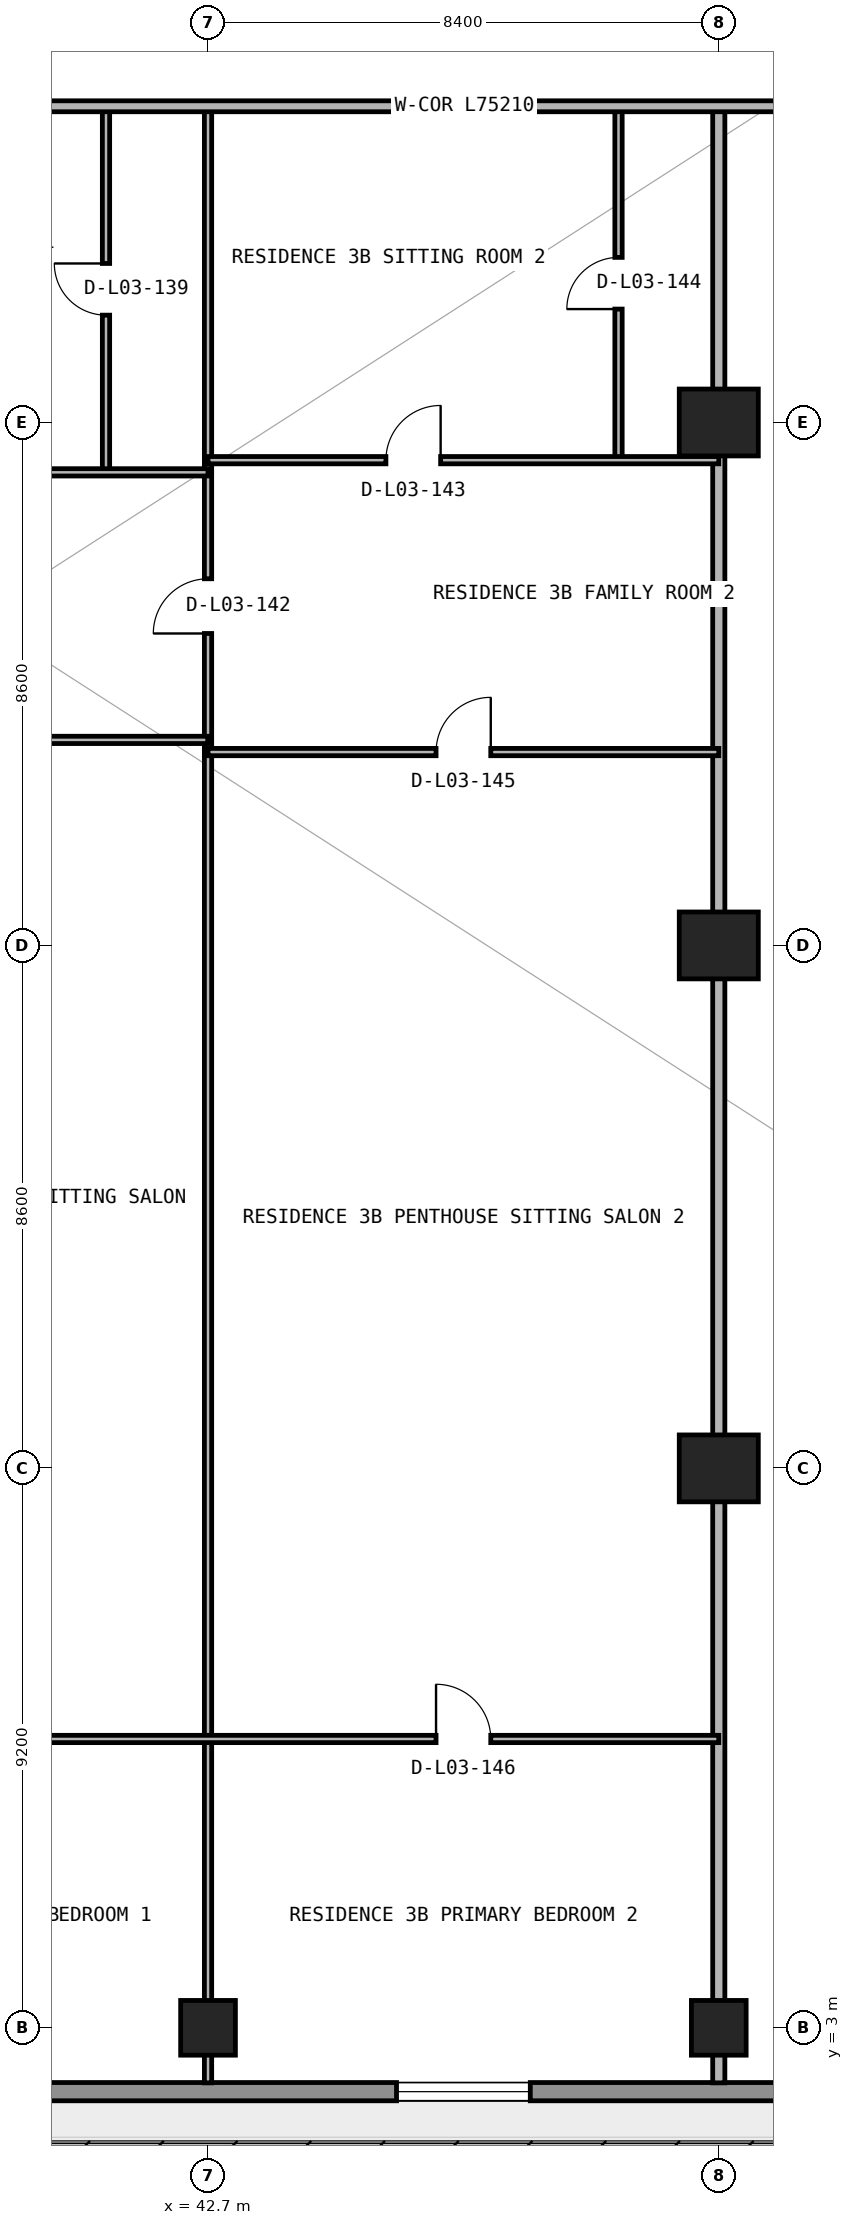
"""IFC4 building model, lengths in metres.
Left out: names, types, materials, properties, quantities, classifications, styles, units other than length and angle.
Written with IfcOpenShell. Run it as: python <this file> out.ifc"""

import sys

from ifc_helpers import new_model, si_unit, direction, frame, frame_2d, origin, origin_2d, place, context, subcontext, project, spatial, rectangle, circle, extrude, element, fill, save


model = new_model("IFC4")
c1 = context("Model", 3, precision=1e-05, world=origin(), true_north=direction((0.0, 1.0)))
c2 = subcontext(c1, "Body", "Model", "MODEL_VIEW")
j1 = project(units=[si_unit("LENGTHUNIT", "METRE"), si_unit("PLANEANGLEUNIT", "RADIAN")], contexts=[c1])
p1 = place(None, origin())
s1 = spatial("IfcSite", under=j1, at=p1, CompositionType="ELEMENT")
p2 = place(p1, origin())
s2 = spatial("IfcBuilding", under=s1, at=p2, CompositionType="ELEMENT")
p3 = place(p2, frame((0.0, 0.0, 15.0)))
s3 = spatial("IfcBuildingStorey", under=s2, at=p3, CompositionType="ELEMENT", Elevation=15.0)
for number, where, z_axis, x_axis in (
    (1, (42.7, 3.0, 0.0), (0.0, 0.0, 1.0), (1.0, 0.0, 0.0)),
    (2, (51.1, 3.0, 0.0), (0.0, 0.0, 1.0), (1.0, 0.0, 0.0)),
):
    element("IfcColumn", number, at=place(p3, frame(where, z_axis=z_axis, x_axis=x_axis)), inside=s3, PredefinedType="COLUMN", context=c2, shape_type="SweptSolid", body=[
        extrude(circle(Radius=0.45, at=origin_2d()), origin(), (0.0, 0.0, 1.0), 4.5),
    ])
for number, where, z_axis, x_axis in (
    (3, (51.1, 12.2, 0.0), (0.0, 0.0, 1.0), (1.0, 0.0, 0.0)),
    (4, (51.1, 20.8, 0.0), (0.0, 0.0, 1.0), (1.0, 0.0, 0.0)),
    (5, (51.1, 29.4, 0.0), (0.0, 0.0, 1.0), (1.0, 0.0, 0.0)),
):
    element("IfcColumn", number, at=place(p3, frame(where, z_axis=z_axis, x_axis=x_axis)), inside=s3, PredefinedType="COLUMN", context=c2, shape_type="SweptSolid", body=[
        extrude(rectangle(XDim=1.3, YDim=1.1, at=origin_2d()), origin(), (0.0, 0.0, 1.0), 4.5),
    ])
p4 = place(p3, frame((76.8, 1.95, 0.0), z_axis=(0.0, 0.0, 1.0), x_axis=(-1.0, 0.0, 0.0)))
e6 = element("IfcWall", 6, at=p4, inside=s3, PredefinedType="STANDARD", context=c2, shape_type="SweptSolid", body=[
    extrude(rectangle(XDim=75.8, YDim=0.3, at=frame_2d((37.9, 0.0))), origin(), (0.0, 0.0, 1.0), 4.5),
])
p5 = place(p4, frame((69.775, 0.0, 0.85)))
e7 = element("IfcOpeningElement", 7, at=p5, cuts=e6, PredefinedType="OPENING", context=c2, shape_type="SweptSolid", body=[
    extrude(rectangle(XDim=3.0, YDim=2.4, at=frame_2d((1.5, 1.2))), frame((0.0, 0.16, 0.0), z_axis=(0.0, -1.0, 0.0), x_axis=(1.0, 0.0, 0.0)), (0.0, 0.0, 1.0), 0.32),
])
p6 = place(p4, frame((61.8, 0.0, 0.0)))
e8 = element("IfcOpeningElement", 8, at=p6, cuts=e6, PredefinedType="OPENING", context=c2, shape_type="SweptSolid", body=[
    extrude(rectangle(XDim=1.8, YDim=2.3, at=frame_2d((0.9, 1.15))), frame((0.0, 0.16, 0.0), z_axis=(0.0, -1.0, 0.0), x_axis=(1.0, 0.0, 0.0)), (0.0, 0.0, 1.0), 0.32),
])
p7 = place(p4, frame((53.2, 0.0, 0.85)))
e9 = element("IfcOpeningElement", 9, at=p7, cuts=e6, PredefinedType="OPENING", context=c2, shape_type="SweptSolid", body=[
    extrude(rectangle(XDim=2.2, YDim=1.55, at=frame_2d((1.1, 0.775))), frame((0.0, 0.16, 0.0), z_axis=(0.0, -1.0, 0.0), x_axis=(1.0, 0.0, 0.0)), (0.0, 0.0, 1.0), 0.32),
])
p8 = place(p4, frame((45.0, 0.0, 0.0)))
e10 = element("IfcOpeningElement", 10, at=p8, cuts=e6, PredefinedType="OPENING", context=c2, shape_type="SweptSolid", body=[
    extrude(rectangle(XDim=1.8, YDim=2.3, at=frame_2d((0.9, 1.15))), frame((0.0, 0.16, 0.0), z_axis=(0.0, -1.0, 0.0), x_axis=(1.0, 0.0, 0.0)), (0.0, 0.0, 1.0), 0.32),
])
p9 = place(p4, frame((36.8, 0.0, 0.85)))
e11 = element("IfcOpeningElement", 11, at=p9, cuts=e6, PredefinedType="OPENING", context=c2, shape_type="SweptSolid", body=[
    extrude(rectangle(XDim=2.2, YDim=1.55, at=frame_2d((1.1, 0.775))), frame((0.0, 0.16, 0.0), z_axis=(0.0, -1.0, 0.0), x_axis=(1.0, 0.0, 0.0)), (0.0, 0.0, 1.0), 0.32),
])
p10 = place(p4, frame((28.8, 0.0, 0.85)))
e12 = element("IfcOpeningElement", 12, at=p10, cuts=e6, PredefinedType="OPENING", context=c2, shape_type="SweptSolid", body=[
    extrude(rectangle(XDim=2.2, YDim=1.55, at=frame_2d((1.1, 0.775))), frame((0.0, 0.16, 0.0), z_axis=(0.0, -1.0, 0.0), x_axis=(1.0, 0.0, 0.0)), (0.0, 0.0, 1.0), 0.32),
])
p11 = place(p4, frame((12.025, 0.0, 0.0)))
e13 = element("IfcOpeningElement", 13, at=p11, cuts=e6, PredefinedType="OPENING", context=c2, shape_type="SweptSolid", body=[
    extrude(rectangle(XDim=1.8, YDim=2.3, at=frame_2d((0.9, 1.15))), frame((0.0, 0.16, 0.0), z_axis=(0.0, -1.0, 0.0), x_axis=(1.0, 0.0, 0.0)), (0.0, 0.0, 1.0), 0.32),
])
p12 = place(p3, frame((41.022, 28.58, 0.0), z_axis=(0.0, 0.0, 1.0), x_axis=(0.0, 1.0, 0.0)))
e14 = element("IfcWall", 14, at=p12, inside=s3, PredefinedType="PARTITIONING", context=c2, shape_type="SweptSolid", body=[
    extrude(rectangle(XDim=6.02, YDim=0.12, at=frame_2d((3.01, 0.0))), origin(), (0.0, 0.0, 1.0), 4.5),
])
p13 = place(p12, frame((2.585, 0.0, 0.0)))
e15 = element("IfcOpeningElement", 15, at=p13, cuts=e14, PredefinedType="OPENING", context=c2, shape_type="SweptSolid", body=[
    extrude(rectangle(XDim=0.85, YDim=2.1, at=frame_2d((0.425, 1.05))), frame((0.0, 0.07, 0.0), z_axis=(0.0, -1.0, 0.0), x_axis=(1.0, 0.0, 0.0)), (0.0, 0.0, 1.0), 0.14),
])
p14 = place(p3, frame((42.7, 2.095, 0.0), z_axis=(0.0, 0.0, 1.0), x_axis=(0.0, 1.0, 0.0)))
e16 = element("IfcWall", 16, at=p14, inside=s3, PredefinedType="PARTITIONING", context=c2, shape_type="SweptSolid", body=[
    extrude(rectangle(XDim=32.505, YDim=0.12, at=frame_2d((16.252, 0.0))), origin(), (0.0, 0.0, 1.0), 4.5),
])
p15 = place(p14, frame((23.835, 0.0, 0.0)))
e17 = element("IfcOpeningElement", 17, at=p15, cuts=e16, PredefinedType="OPENING", context=c2, shape_type="SweptSolid", body=[
    extrude(rectangle(XDim=0.9, YDim=2.15, at=frame_2d((0.45, 1.075))), frame((0.0, 0.07, 0.0), z_axis=(0.0, -1.0, 0.0), x_axis=(1.0, 0.0, 0.0)), (0.0, 0.0, 1.0), 0.14),
])
p16 = place(p3, frame((49.451, 28.78, 0.0), z_axis=(0.0, 0.0, 1.0), x_axis=(0.0, 1.0, 0.0)))
e18 = element("IfcWall", 18, at=p16, inside=s3, PredefinedType="PARTITIONING", context=c2, shape_type="SweptSolid", body=[
    extrude(rectangle(XDim=5.82, YDim=0.12, at=frame_2d((2.91, 0.0))), origin(), (0.0, 0.0, 1.0), 4.5),
])
p17 = place(p16, frame((2.485, 0.0, 0.0)))
e19 = element("IfcOpeningElement", 19, at=p17, cuts=e18, PredefinedType="OPENING", context=c2, shape_type="SweptSolid", body=[
    extrude(rectangle(XDim=0.85, YDim=2.1, at=frame_2d((0.425, 1.05))), frame((0.0, 0.07, 0.0), z_axis=(0.0, -1.0, 0.0), x_axis=(1.0, 0.0, 0.0)), (0.0, 0.0, 1.0), 0.14),
])
p18 = place(p3, frame((51.1, 2.095, 0.0), z_axis=(0.0, 0.0, 1.0), x_axis=(0.0, 1.0, 0.0)))
e20 = element("IfcWall", 20, at=p18, inside=s3, PredefinedType="PARTITIONING", context=c2, shape_type="SweptSolid", body=[
    extrude(rectangle(XDim=32.505, YDim=0.2, at=frame_2d((16.252, 0.0))), origin(), (0.0, 0.0, 1.0), 3.464),
])
p19 = place(p3, frame((35.1, 7.75, 0.0), z_axis=(0.0, 0.0, 1.0), x_axis=(1.0, 0.0, 0.0)))
e21 = element("IfcWall", 21, at=p19, inside=s3, PredefinedType="PARTITIONING", context=c2, shape_type="SweptSolid", body=[
    extrude(rectangle(XDim=16.0, YDim=0.12, at=frame_2d((8.0, 0.0))), origin(), (0.0, 0.0, 1.0), 4.5),
])
p20 = place(p19, frame((3.35, 0.0, 0.0)))
e22 = element("IfcOpeningElement", 22, at=p20, cuts=e21, PredefinedType="OPENING", context=c2, shape_type="SweptSolid", body=[
    extrude(rectangle(XDim=0.9, YDim=2.15, at=frame_2d((0.45, 1.075))), frame((0.0, 0.07, 0.0), z_axis=(0.0, -1.0, 0.0), x_axis=(1.0, 0.0, 0.0)), (0.0, 0.0, 1.0), 0.14),
])
p21 = place(p19, frame((11.35, 0.0, 0.0)))
e23 = element("IfcOpeningElement", 23, at=p21, cuts=e21, PredefinedType="OPENING", context=c2, shape_type="SweptSolid", body=[
    extrude(rectangle(XDim=0.9, YDim=2.15, at=frame_2d((0.45, 1.075))), frame((0.0, 0.07, 0.0), z_axis=(0.0, -1.0, 0.0), x_axis=(1.0, 0.0, 0.0)), (0.0, 0.0, 1.0), 0.14),
])
p22 = place(p3, frame((42.7, 23.98, 0.0), z_axis=(0.0, 0.0, 1.0), x_axis=(1.0, 0.0, 0.0)))
e24 = element("IfcWall", 24, at=p22, inside=s3, PredefinedType="PARTITIONING", context=c2, shape_type="SweptSolid", body=[
    extrude(rectangle(XDim=8.4, YDim=0.12, at=frame_2d((4.2, 0.0))), origin(), (0.0, 0.0, 1.0), 4.5),
])
p23 = place(p22, frame((3.75, 0.0, 0.0)))
e25 = element("IfcOpeningElement", 25, at=p23, cuts=e24, PredefinedType="OPENING", context=c2, shape_type="SweptSolid", body=[
    extrude(rectangle(XDim=0.9, YDim=2.15, at=frame_2d((0.45, 1.075))), frame((0.0, 0.07, 0.0), z_axis=(0.0, -1.0, 0.0), x_axis=(1.0, 0.0, 0.0)), (0.0, 0.0, 1.0), 0.14),
])
p24 = place(p3, frame((35.105, 24.18, 0.0), z_axis=(0.0, 0.0, 1.0), x_axis=(1.0, 0.0, 0.0)))
e26 = element("IfcWall", 26, at=p24, inside=s3, PredefinedType="PARTITIONING", context=c2, shape_type="SweptSolid", body=[
    extrude(rectangle(XDim=7.59, YDim=0.12, at=frame_2d((3.795, 0.0))), origin(), (0.0, 0.0, 1.0), 4.5),
])
p25 = place(p24, frame((3.345, 0.0, 0.0)))
e27 = element("IfcOpeningElement", 27, at=p25, cuts=e26, PredefinedType="OPENING", context=c2, shape_type="SweptSolid", body=[
    extrude(rectangle(XDim=0.9, YDim=2.15, at=frame_2d((0.45, 1.075))), frame((0.0, 0.07, 0.0), z_axis=(0.0, -1.0, 0.0), x_axis=(1.0, 0.0, 0.0)), (0.0, 0.0, 1.0), 0.14),
])
p26 = place(p3, frame((35.1, 28.58, 0.0), z_axis=(0.0, 0.0, 1.0), x_axis=(1.0, 0.0, 0.0)))
e28 = element("IfcWall", 28, at=p26, inside=s3, PredefinedType="PARTITIONING", context=c2, shape_type="SweptSolid", body=[
    extrude(rectangle(XDim=7.6, YDim=0.12, at=frame_2d((3.8, 0.0))), origin(), (0.0, 0.0, 1.0), 4.5),
])
p27 = place(p26, frame((2.511, 0.0, 0.0)))
e29 = element("IfcOpeningElement", 29, at=p27, cuts=e28, PredefinedType="OPENING", context=c2, shape_type="SweptSolid", body=[
    extrude(rectangle(XDim=0.9, YDim=2.15, at=frame_2d((0.45, 1.075))), frame((0.0, 0.07, 0.0), z_axis=(0.0, -1.0, 0.0), x_axis=(1.0, 0.0, 0.0)), (0.0, 0.0, 1.0), 0.14),
])
p28 = place(p3, frame((42.7, 28.78, 0.0), z_axis=(0.0, 0.0, 1.0), x_axis=(1.0, 0.0, 0.0)))
e30 = element("IfcWall", 30, at=p28, inside=s3, PredefinedType="PARTITIONING", context=c2, shape_type="SweptSolid", body=[
    extrude(rectangle(XDim=8.4, YDim=0.12, at=frame_2d((4.2, 0.0))), origin(), (0.0, 0.0, 1.0), 4.5),
])
p29 = place(p28, frame((2.926, 0.0, 0.0)))
e31 = element("IfcOpeningElement", 31, at=p29, cuts=e30, PredefinedType="OPENING", context=c2, shape_type="SweptSolid", body=[
    extrude(rectangle(XDim=0.9, YDim=2.15, at=frame_2d((0.45, 1.075))), frame((0.0, 0.07, 0.0), z_axis=(0.0, -1.0, 0.0), x_axis=(1.0, 0.0, 0.0)), (0.0, 0.0, 1.0), 0.14),
])
p30 = place(p3, frame((1.295, 34.6, 0.0), z_axis=(0.0, 0.0, 1.0), x_axis=(1.0, 0.0, 0.0)))
e32 = element("IfcWall", 32, at=p30, inside=s3, PredefinedType="PARTITIONING", context=c2, shape_type="SweptSolid", body=[
    extrude(rectangle(XDim=75.21, YDim=0.18, at=frame_2d((37.605, 0.0))), origin(), (0.0, 0.0, 1.0), 4.5),
])
p31 = place(p30, frame((3.778, 0.0, 0.0)))
e33 = element("IfcOpeningElement", 33, at=p31, cuts=e32, PredefinedType="OPENING", context=c2, shape_type="SweptSolid", body=[
    extrude(rectangle(XDim=1.05, YDim=2.15, at=frame_2d((0.525, 1.075))), frame((0.0, 0.1, 0.0), z_axis=(0.0, -1.0, 0.0), x_axis=(1.0, 0.0, 0.0)), (0.0, 0.0, 1.0), 0.2),
])
p32 = place(p30, frame((11.555, 0.0, 0.0)))
e34 = element("IfcOpeningElement", 34, at=p32, cuts=e32, PredefinedType="OPENING", context=c2, shape_type="SweptSolid", body=[
    extrude(rectangle(XDim=1.0, YDim=2.2, at=frame_2d((0.5, 1.1))), frame((0.0, 0.1, 0.0), z_axis=(0.0, -1.0, 0.0), x_axis=(1.0, 0.0, 0.0)), (0.0, 0.0, 1.0), 0.2),
])
p33 = place(p30, frame((28.263, 0.0, 0.0)))
e35 = element("IfcOpeningElement", 35, at=p33, cuts=e32, PredefinedType="OPENING", context=c2, shape_type="SweptSolid", body=[
    extrude(rectangle(XDim=1.0, YDim=2.2, at=frame_2d((0.5, 1.1))), frame((0.0, 0.1, 0.0), z_axis=(0.0, -1.0, 0.0), x_axis=(1.0, 0.0, 0.0)), (0.0, 0.0, 1.0), 0.2),
])
p34 = place(p30, frame((61.982, 0.0, 0.0)))
e36 = element("IfcOpeningElement", 36, at=p34, cuts=e32, PredefinedType="OPENING", context=c2, shape_type="SweptSolid", body=[
    extrude(rectangle(XDim=1.05, YDim=2.15, at=frame_2d((0.525, 1.075))), frame((0.0, 0.1, 0.0), z_axis=(0.0, -1.0, 0.0), x_axis=(1.0, 0.0, 0.0)), (0.0, 0.0, 1.0), 0.2),
])
p35 = place(p10, origin())
e37 = element("IfcWindow", 37, at=p35, inside=s3, PartitioningType="SINGLE_PANEL", PredefinedType="WINDOW", context=c2, shape_type="SweptSolid", body=[
    extrude(rectangle(XDim=2.2, YDim=1.55, at=frame_2d((1.1, 0.775))), frame((0.0, 0.03, 0.0), z_axis=(0.0, -1.0, 0.0), x_axis=(1.0, 0.0, 0.0)), (0.0, 0.0, 1.0), 0.06),
])
fill(e12, e37)
p36 = place(p13, origin())
e38 = element("IfcDoor", 38, at=p36, inside=s3, OperationType="SINGLE_SWING_RIGHT", PredefinedType="DOOR", context=c2, shape_type="SweptSolid", body=[
    extrude(rectangle(XDim=0.85, YDim=2.1, at=frame_2d((0.425, 1.05))), frame((0.0, 0.025, 0.0), z_axis=(0.0, -1.0, 0.0), x_axis=(1.0, 0.0, 0.0)), (0.0, 0.0, 1.0), 0.05),
])
fill(e15, e38)
p37 = place(p15, origin())
e39 = element("IfcDoor", 39, at=p37, inside=s3, OperationType="SINGLE_SWING_LEFT", PredefinedType="DOOR", context=c2, shape_type="SweptSolid", body=[
    extrude(rectangle(XDim=0.9, YDim=2.15, at=frame_2d((0.45, 1.075))), frame((0.0, 0.025, 0.0), z_axis=(0.0, -1.0, 0.0), x_axis=(1.0, 0.0, 0.0)), (0.0, 0.0, 1.0), 0.05),
])
fill(e17, e39)
p38 = place(p29, origin())
e40 = element("IfcDoor", 40, at=p38, inside=s3, OperationType="SINGLE_SWING_RIGHT", PredefinedType="DOOR", context=c2, shape_type="SweptSolid", body=[
    extrude(rectangle(XDim=0.9, YDim=2.15, at=frame_2d((0.45, 1.075))), frame((0.0, 0.025, 0.0), z_axis=(0.0, -1.0, 0.0), x_axis=(1.0, 0.0, 0.0)), (0.0, 0.0, 1.0), 0.05),
])
fill(e31, e40)
p39 = place(p17, origin())
e41 = element("IfcDoor", 41, at=p39, inside=s3, OperationType="SINGLE_SWING_LEFT", PredefinedType="DOOR", context=c2, shape_type="SweptSolid", body=[
    extrude(rectangle(XDim=0.85, YDim=2.1, at=frame_2d((0.425, 1.05))), frame((0.0, 0.025, 0.0), z_axis=(0.0, -1.0, 0.0), x_axis=(1.0, 0.0, 0.0)), (0.0, 0.0, 1.0), 0.05),
])
fill(e19, e41)
p40 = place(p23, origin())
e42 = element("IfcDoor", 42, at=p40, inside=s3, OperationType="SINGLE_SWING_RIGHT", PredefinedType="DOOR", context=c2, shape_type="SweptSolid", body=[
    extrude(rectangle(XDim=0.9, YDim=2.15, at=frame_2d((0.45, 1.075))), frame((0.0, 0.025, 0.0), z_axis=(0.0, -1.0, 0.0), x_axis=(1.0, 0.0, 0.0)), (0.0, 0.0, 1.0), 0.05),
])
fill(e25, e42)
p41 = place(p21, origin())
e43 = element("IfcDoor", 43, at=p41, inside=s3, OperationType="SINGLE_SWING_LEFT", PredefinedType="DOOR", context=c2, shape_type="SweptSolid", body=[
    extrude(rectangle(XDim=0.9, YDim=2.15, at=frame_2d((0.45, 1.075))), frame((0.0, 0.025, 0.0), z_axis=(0.0, -1.0, 0.0), x_axis=(1.0, 0.0, 0.0)), (0.0, 0.0, 1.0), 0.05),
])
fill(e23, e43)
save(model, sys.argv[1])
